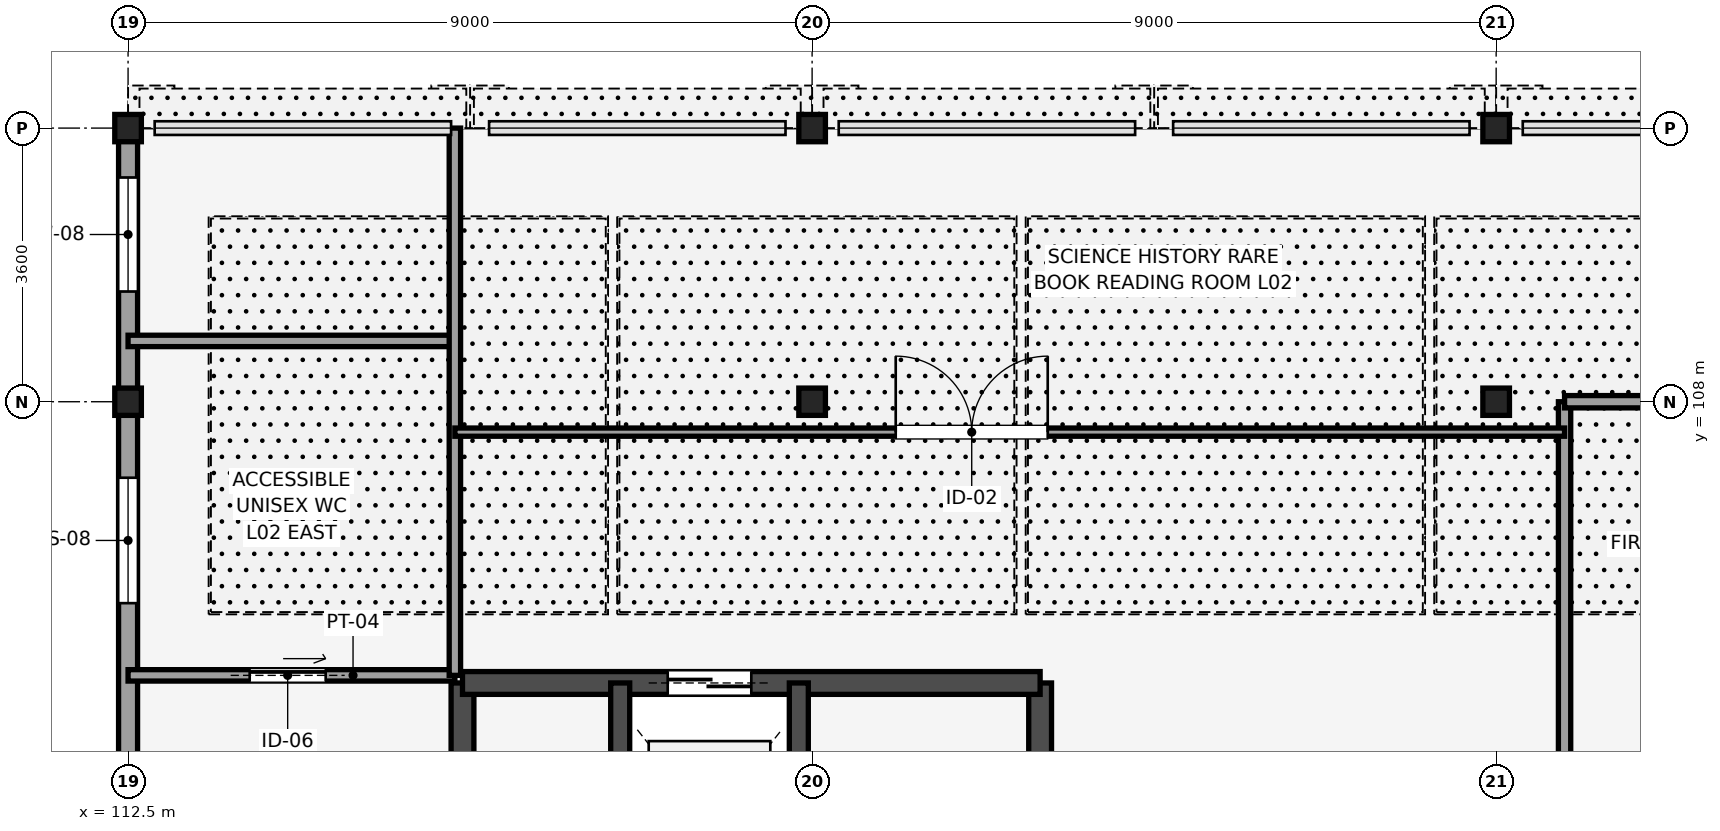
"""IFC4 building model, lengths in metres.
Left out: names, types, materials, properties, quantities, classifications, styles, units other than length and angle.
Written with IfcOpenShell. Run it as: python <this file> out.ifc"""

import sys

from ifc_helpers import new_model, si_unit, direction, frame, frame_2d, origin, origin_2d, place, context, subcontext, project, spatial, rectangle, i_section, extrude, element, fill, save


model = new_model("IFC4")
c1 = context("Model", 3, precision=1e-05, world=origin(), true_north=direction((0.0, 1.0)))
c2 = subcontext(c1, "Body", "Model", "MODEL_VIEW")
j1 = project(units=[si_unit("LENGTHUNIT", "METRE"), si_unit("PLANEANGLEUNIT", "RADIAN")], contexts=[c1])
p1 = place(None, origin())
s1 = spatial("IfcSite", under=j1, at=p1, CompositionType="ELEMENT")
p2 = place(p1, origin())
s2 = spatial("IfcBuilding", under=s1, at=p2, CompositionType="ELEMENT")
p3 = place(p2, frame((0.0, 0.0, 9.9)))
s3 = spatial("IfcBuildingStorey", under=s2, at=p3, CompositionType="ELEMENT", Elevation=9.9)
for number, where, z_axis, x_axis in (
    (1, (112.5, 108.0, 0.0), (0.0, 0.0, 1.0), (1.0, 0.0, 0.0)),
    (2, (112.5, 111.6, 0.0), (0.0, 0.0, 1.0), (1.0, 0.0, 0.0)),
    (3, (121.5, 108.0, 0.0), (0.0, 0.0, 1.0), (1.0, 0.0, 0.0)),
    (4, (121.5, 111.6, 0.0), (0.0, 0.0, 1.0), (1.0, 0.0, 0.0)),
    (5, (130.5, 108.0, 0.0), (0.0, 0.0, 1.0), (1.0, 0.0, 0.0)),
    (6, (130.5, 111.6, 0.0), (0.0, 0.0, 1.0), (1.0, 0.0, 0.0)),
):
    element("IfcColumn", number, at=place(p3, frame(where, z_axis=z_axis, x_axis=x_axis)), inside=s3, PredefinedType="COLUMN", context=c2, shape_type="SweptSolid", body=[
        extrude(i_section(OverallWidth=0.35, OverallDepth=0.359, WebThickness=0.016, FlangeThickness=0.024, FilletRadius=0.014, at=origin_2d()), origin(), (0.0, 0.0, 1.0), 4.5),
    ])
p4 = place(p3, frame((116.9, 96.7, 0.0), z_axis=(0.0, 0.0, 1.0), x_axis=(0.0, 1.0, 0.0)))
e7 = element("IfcWall", 7, at=p4, inside=s3, PredefinedType="SHEAR", context=c2, shape_type="SweptSolid", body=[
    extrude(rectangle(XDim=7.6, YDim=0.3, at=frame_2d((3.8, 0.0))), origin(), (0.0, 0.0, 1.0), 4.5),
])
p5 = place(p4, frame((0.45, 0.0, 0.0)))
e8 = element("IfcOpeningElement", 8, at=p5, cuts=e7, PredefinedType="OPENING", context=c2, shape_type="SweptSolid", body=[
    extrude(rectangle(XDim=1.15, YDim=2.15, at=frame_2d((0.575, 1.075))), frame((0.0, 0.16, 0.0), z_axis=(0.0, -1.0, 0.0), x_axis=(1.0, 0.0, 0.0)), (0.0, 0.0, 1.0), 0.32),
])
p6 = place(p3, frame((124.5, 96.7, 0.0), z_axis=(0.0, 0.0, 1.0), x_axis=(0.0, 1.0, 0.0)))
e9 = element("IfcWall", 9, at=p6, inside=s3, PredefinedType="SHEAR", context=c2, shape_type="SweptSolid", body=[
    extrude(rectangle(XDim=7.6, YDim=0.3, at=frame_2d((3.8, 0.0))), origin(), (0.0, 0.0, 1.0), 4.5),
])
p7 = place(p3, frame((116.9, 104.3, 0.0), z_axis=(0.0, 0.0, 1.0), x_axis=(1.0, 0.0, 0.0)))
e10 = element("IfcWall", 10, at=p7, inside=s3, PredefinedType="SHEAR", context=c2, shape_type="SweptSolid", body=[
    extrude(rectangle(XDim=7.6, YDim=0.3, at=frame_2d((3.8, 0.0))), origin(), (0.0, 0.0, 1.0), 4.5),
])
p8 = place(p7, frame((2.7, 0.0, 0.0)))
e11 = element("IfcOpeningElement", 11, at=p8, cuts=e10, PredefinedType="OPENING", context=c2, shape_type="SweptSolid", body=[
    extrude(rectangle(XDim=1.1, YDim=2.2, at=frame_2d((0.55, 1.1))), frame((0.0, 0.16, 0.0), z_axis=(0.0, -1.0, 0.0), x_axis=(1.0, 0.0, 0.0)), (0.0, 0.0, 1.0), 0.32),
])
for number, where, z_axis, x_axis in (
    (12, (118.975, 100.695, 0.0), (0.0, 0.0, 1.0), (0.0, 1.0, 0.0)),
    (13, (121.325, 100.695, 0.0), (0.0, 0.0, 1.0), (0.0, 1.0, 0.0)),
):
    element("IfcWall", number, at=place(p3, frame(where, z_axis=z_axis, x_axis=x_axis)), inside=s3, PredefinedType="SHEAR", context=c2, shape_type="SweptSolid", body=[
        extrude(rectangle(XDim=3.605, YDim=0.25, at=frame_2d((1.802, 0.0))), origin(), (0.0, 0.0, 1.0), 4.5),
    ])
p9 = place(p3, frame((112.5, 111.6, 0.0), z_axis=(0.0, 0.0, 1.0), x_axis=(0.0, -1.0, 0.0)))
e14 = element("IfcWall", 14, at=p9, inside=s3, PredefinedType="STANDARD", context=c2, shape_type="SweptSolid", body=[
    extrude(rectangle(XDim=12.6, YDim=0.25, at=frame_2d((6.3, 0.0))), origin(), (0.0, 0.0, 1.0), 3.846),
])
p10 = place(p9, frame((0.65, 0.0, 1.0)))
e15 = element("IfcOpeningElement", 15, at=p10, cuts=e14, PredefinedType="OPENING", context=c2, shape_type="SweptSolid", body=[
    extrude(rectangle(XDim=1.5, YDim=1.5, at=frame_2d((0.75, 0.75))), frame((0.0, 0.135, 0.0), z_axis=(0.0, -1.0, 0.0), x_axis=(1.0, 0.0, 0.0)), (0.0, 0.0, 1.0), 0.27),
])
p11 = place(p9, frame((8.9, 0.0, 1.0)))
e16 = element("IfcOpeningElement", 16, at=p11, cuts=e14, PredefinedType="OPENING", context=c2, shape_type="SweptSolid", body=[
    extrude(rectangle(XDim=1.5, YDim=1.5, at=frame_2d((0.75, 0.75))), frame((0.0, 0.135, 0.0), z_axis=(0.0, -1.0, 0.0), x_axis=(1.0, 0.0, 0.0)), (0.0, 0.0, 1.0), 0.27),
])
p12 = place(p9, frame((4.6, 0.0, 1.0)))
e17 = element("IfcOpeningElement", 17, at=p12, cuts=e14, PredefinedType="OPENING", context=c2, shape_type="SweptSolid", body=[
    extrude(rectangle(XDim=1.65, YDim=1.55, at=frame_2d((0.825, 0.775))), frame((0.0, 0.135, 0.0), z_axis=(0.0, -1.0, 0.0), x_axis=(1.0, 0.0, 0.0)), (0.0, 0.0, 1.0), 0.27),
])
p13 = place(p3, frame((131.4, 96.6, 0.0), z_axis=(0.0, 0.0, 1.0), x_axis=(0.0, 1.0, 0.0)))
e18 = element("IfcWall", 18, at=p13, inside=s3, PredefinedType="PARTITIONING", context=c2, shape_type="SweptSolid", body=[
    extrude(rectangle(XDim=11.4, YDim=0.162, at=frame_2d((5.7, 0.0))), origin(), (0.0, 0.0, 1.0), 4.32),
])
p14 = place(p13, frame((3.8, 0.0, 0.0)))
e19 = element("IfcOpeningElement", 19, at=p14, cuts=e18, PredefinedType="OPENING", context=c2, shape_type="SweptSolid", body=[
    extrude(rectangle(XDim=1.47, YDim=2.175, at=frame_2d((0.735, 1.087))), frame((0.0, 0.091, 0.0), z_axis=(0.0, -1.0, 0.0), x_axis=(1.0, 0.0, 0.0)), (0.0, 0.0, 1.0), 0.182),
])
p15 = place(p3, frame((131.4, 108.0, 0.0), z_axis=(0.0, 0.0, 1.0), x_axis=(1.0, 0.0, 0.0)))
e20 = element("IfcWall", 20, at=p15, inside=s3, PredefinedType="PARTITIONING", context=c2, shape_type="SweptSolid", body=[
    extrude(rectangle(XDim=11.6, YDim=0.162, at=frame_2d((5.8, 0.0))), origin(), (0.0, 0.0, 1.0), 3.846),
])
p16 = place(p3, frame((112.5, 104.4, 0.0), z_axis=(0.0, 0.0, 1.0), x_axis=(1.0, 0.0, 0.0)))
e21 = element("IfcWall", 21, at=p16, inside=s3, PredefinedType="PARTITIONING", context=c2, shape_type="SweptSolid", body=[
    extrude(rectangle(XDim=4.3, YDim=0.15, at=frame_2d((2.15, 0.0))), origin(), (0.0, 0.0, 1.0), 4.32),
])
p17 = place(p16, frame((1.6, 0.0, 0.0)))
e22 = element("IfcOpeningElement", 22, at=p17, cuts=e21, PredefinedType="OPENING", context=c2, shape_type="SweptSolid", body=[
    extrude(rectangle(XDim=1.0, YDim=2.15, at=frame_2d((0.5, 1.075))), frame((0.0, 0.085, 0.0), z_axis=(0.0, -1.0, 0.0), x_axis=(1.0, 0.0, 0.0)), (0.0, 0.0, 1.0), 0.17),
])
p18 = place(p3, frame((112.5, 108.8, 0.0), z_axis=(0.0, 0.0, 1.0), x_axis=(1.0, 0.0, 0.0)))
e23 = element("IfcWall", 23, at=p18, inside=s3, PredefinedType="PARTITIONING", context=c2, shape_type="SweptSolid", body=[
    extrude(rectangle(XDim=4.3, YDim=0.15, at=frame_2d((2.15, 0.0))), origin(), (0.0, 0.0, 1.0), 4.32),
])
p19 = place(p3, frame((116.8, 104.4, 0.0), z_axis=(0.0, 0.0, 1.0), x_axis=(0.0, 1.0, 0.0)))
e24 = element("IfcWall", 24, at=p19, inside=s3, PredefinedType="PARTITIONING", context=c2, shape_type="SweptSolid", body=[
    extrude(rectangle(XDim=7.2, YDim=0.15, at=frame_2d((3.6, 0.0))), origin(), (0.0, 0.0, 1.0), 4.32),
])
p20 = place(p3, frame((116.8, 107.6, 0.0), z_axis=(0.0, 0.0, 1.0), x_axis=(1.0, 0.0, 0.0)))
e25 = element("IfcWall", 25, at=p20, inside=s3, PredefinedType="PARTITIONING", context=c2, shape_type="SweptSolid", body=[
    extrude(rectangle(XDim=14.6, YDim=0.108, at=frame_2d((7.3, 0.0))), origin(), (0.0, 0.0, 1.0), 4.32),
])
p21 = place(p20, frame((5.8, 0.0, 0.0)))
e26 = element("IfcOpeningElement", 26, at=p21, cuts=e25, PredefinedType="OPENING", context=c2, shape_type="SweptSolid", body=[
    extrude(rectangle(XDim=2.0, YDim=2.4, at=frame_2d((1.0, 1.2))), frame((0.0, 0.064, 0.0), z_axis=(0.0, -1.0, 0.0), x_axis=(1.0, 0.0, 0.0)), (0.0, 0.0, 1.0), 0.128),
])
p22 = place(p10, origin())
e27 = element("IfcWindow", 27, at=p22, inside=s3, PartitioningType="SINGLE_PANEL", PredefinedType="WINDOW", context=c2, shape_type="SweptSolid", body=[
    extrude(rectangle(XDim=1.5, YDim=1.5, at=frame_2d((0.75, 0.75))), frame((0.0, 0.03, 0.0), z_axis=(0.0, -1.0, 0.0), x_axis=(1.0, 0.0, 0.0)), (0.0, 0.0, 1.0), 0.06),
])
fill(e15, e27)
p23 = place(p12, origin())
e28 = element("IfcWindow", 28, at=p23, inside=s3, PartitioningType="SINGLE_PANEL", PredefinedType="WINDOW", context=c2, shape_type="SweptSolid", body=[
    extrude(rectangle(XDim=1.65, YDim=1.55, at=frame_2d((0.825, 0.775))), frame((0.0, 0.03, 0.0), z_axis=(0.0, -1.0, 0.0), x_axis=(1.0, 0.0, 0.0)), (0.0, 0.0, 1.0), 0.06),
])
fill(e17, e28)
p24 = place(p8, origin())
e29 = element("IfcDoor", 29, at=p24, inside=s3, OperationType="DOUBLE_DOOR_SLIDING", PredefinedType="DOOR", context=c2, shape_type="SweptSolid", body=[
    extrude(rectangle(XDim=1.1, YDim=2.2, at=frame_2d((0.55, 1.1))), frame((0.0, 0.025, 0.0), z_axis=(0.0, -1.0, 0.0), x_axis=(1.0, 0.0, 0.0)), (0.0, 0.0, 1.0), 0.05),
])
fill(e11, e29)
p25 = place(p17, origin())
e30 = element("IfcDoor", 30, at=p25, inside=s3, OperationType="SLIDING_TO_LEFT", PredefinedType="DOOR", context=c2, shape_type="SweptSolid", body=[
    extrude(rectangle(XDim=1.0, YDim=2.15, at=frame_2d((0.5, 1.075))), frame((0.0, 0.025, 0.0), z_axis=(0.0, -1.0, 0.0), x_axis=(1.0, 0.0, 0.0)), (0.0, 0.0, 1.0), 0.05),
])
fill(e22, e30)
p26 = place(p21, origin())
e31 = element("IfcDoor", 31, at=p26, inside=s3, OperationType="DOUBLE_DOOR_DOUBLE_SWING", PredefinedType="DOOR", context=c2, shape_type="SweptSolid", body=[
    extrude(rectangle(XDim=2.0, YDim=2.4, at=frame_2d((1.0, 1.2))), frame((0.0, 0.025, 0.0), z_axis=(0.0, -1.0, 0.0), x_axis=(1.0, 0.0, 0.0)), (0.0, 0.0, 1.0), 0.05),
])
fill(e26, e31)
save(model, sys.argv[1])
